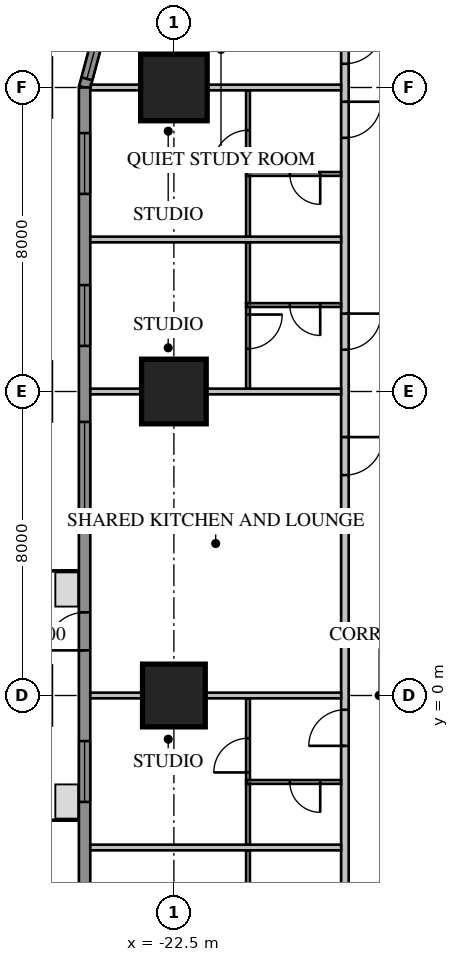
"""IFC4 building model, lengths in metres.
Left out: names, types, materials, properties, quantities, classifications, styles, units other than length and angle.
Written with IfcOpenShell. Run it as: python <this file> out.ifc"""

import sys

from ifc_helpers import new_model, si_unit, direction, frame, frame_2d, origin, origin_2d, place, context, subcontext, project, spatial, rectangle, extrude, element, fill, save


model = new_model("IFC4")
c1 = context("Model", 3, precision=1e-05, world=origin(), true_north=direction((0.0, 1.0)))
c2 = subcontext(c1, "Body", "Model", "MODEL_VIEW")
j1 = project(units=[si_unit("LENGTHUNIT", "METRE"), si_unit("PLANEANGLEUNIT", "RADIAN")], contexts=[c1])
p1 = place(None, origin())
s1 = spatial("IfcSite", under=j1, at=p1, CompositionType="ELEMENT")
p2 = place(p1, origin())
s2 = spatial("IfcBuilding", under=s1, at=p2, CompositionType="ELEMENT")
p3 = place(p2, frame((0.0, 0.0, 46.8)))
s3 = spatial("IfcBuildingStorey", under=s2, at=p3, CompositionType="ELEMENT", Elevation=46.8)
p4 = place(p3, frame((-22.5, 16.0, 0.0), z_axis=(0.0, 0.0, 1.0), x_axis=(1.0, 0.0, 0.0)))
e1 = element("IfcColumn", 1, at=p4, inside=s3, PredefinedType="COLUMN", context=c2, shape_type="SweptSolid", body=[
    extrude(rectangle(XDim=1.75, YDim=1.75, at=origin_2d()), origin(), (0.0, 0.0, 1.0), 3.85),
])
p5 = place(p3, frame((-22.5, 8.0, 0.0), z_axis=(0.0, 0.0, 1.0), x_axis=(1.0, 0.0, 0.0)))
e2 = element("IfcColumn", 2, at=p5, inside=s3, PredefinedType="COLUMN", context=c2, shape_type="SweptSolid", body=[
    extrude(rectangle(XDim=1.7, YDim=1.7, at=origin_2d()), origin(), (0.0, 0.0, 1.0), 3.85),
])
p6 = place(p3, frame((-22.5, 0.0, 0.0), z_axis=(0.0, 0.0, 1.0), x_axis=(1.0, 0.0, 0.0)))
e3 = element("IfcColumn", 3, at=p6, inside=s3, PredefinedType="COLUMN", context=c2, shape_type="SweptSolid", body=[
    extrude(rectangle(XDim=1.65, YDim=1.65, at=origin_2d()), origin(), (0.0, 0.0, 1.0), 3.85),
])
p7 = place(p3, frame((-23.664, 20.425, 0.0), z_axis=(0.0, 0.0, 1.0), x_axis=(-0.258839972501, -0.965920218567, 0.0)))
e4 = element("IfcWall", 4, at=p7, inside=s3, PredefinedType="SOLIDWALL", context=c2, shape_type="SweptSolid", body=[
    extrude(rectangle(XDim=4.581, YDim=0.3, at=frame_2d((2.291, 0.0))), origin(), (0.0, 0.0, 1.0), 3.65),
])
p8 = place(p7, frame((2.746, 0.0, 0.75)))
e5 = element("IfcOpeningElement", 5, at=p8, cuts=e4, PredefinedType="OPENING", context=c2, shape_type="SweptSolid", body=[
    extrude(rectangle(XDim=1.6, YDim=1.8, at=frame_2d((0.8, 0.9))), frame((0.0, 0.17, 0.0), z_axis=(0.0, -1.0, 0.0), x_axis=(1.0, 0.0, 0.0)), (0.0, 0.0, 1.0), 0.34),
])
p9 = place(p3, frame((-24.85, 16.0, 0.0), z_axis=(0.0, 0.0, 1.0), x_axis=(0.0, -1.0, 0.0)))
e6 = element("IfcWall", 6, at=p9, inside=s3, PredefinedType="SOLIDWALL", context=c2, shape_type="SweptSolid", body=[
    extrude(rectangle(XDim=32.0, YDim=0.3, at=frame_2d((16.0, 0.0))), origin(), (0.0, 0.0, 1.0), 3.65),
])
p10 = place(p9, frame((1.2, 0.0, 0.75)))
e7 = element("IfcOpeningElement", 7, at=p10, cuts=e6, PredefinedType="OPENING", context=c2, shape_type="SweptSolid", body=[
    extrude(rectangle(XDim=1.6, YDim=1.8, at=frame_2d((0.8, 0.9))), frame((0.0, 0.17, 0.0), z_axis=(0.0, -1.0, 0.0), x_axis=(1.0, 0.0, 0.0)), (0.0, 0.0, 1.0), 0.34),
])
p11 = place(p9, frame((5.2, 0.0, 0.75)))
e8 = element("IfcOpeningElement", 8, at=p11, cuts=e6, PredefinedType="OPENING", context=c2, shape_type="SweptSolid", body=[
    extrude(rectangle(XDim=1.6, YDim=1.8, at=frame_2d((0.8, 0.9))), frame((0.0, 0.17, 0.0), z_axis=(0.0, -1.0, 0.0), x_axis=(1.0, 0.0, 0.0)), (0.0, 0.0, 1.0), 0.34),
])
p12 = place(p9, frame((17.2, 0.0, 0.75)))
e9 = element("IfcOpeningElement", 9, at=p12, cuts=e6, PredefinedType="OPENING", context=c2, shape_type="SweptSolid", body=[
    extrude(rectangle(XDim=1.6, YDim=1.8, at=frame_2d((0.8, 0.9))), frame((0.0, 0.17, 0.0), z_axis=(0.0, -1.0, 0.0), x_axis=(1.0, 0.0, 0.0)), (0.0, 0.0, 1.0), 0.34),
])
p13 = place(p9, frame((21.2, 0.0, 0.75)))
e10 = element("IfcOpeningElement", 10, at=p13, cuts=e6, PredefinedType="OPENING", context=c2, shape_type="SweptSolid", body=[
    extrude(rectangle(XDim=1.6, YDim=1.8, at=frame_2d((0.8, 0.9))), frame((0.0, 0.17, 0.0), z_axis=(0.0, -1.0, 0.0), x_axis=(1.0, 0.0, 0.0)), (0.0, 0.0, 1.0), 0.34),
])
p14 = place(p9, frame((25.2, 0.0, 0.75)))
e11 = element("IfcOpeningElement", 11, at=p14, cuts=e6, PredefinedType="OPENING", context=c2, shape_type="SweptSolid", body=[
    extrude(rectangle(XDim=1.6, YDim=1.8, at=frame_2d((0.8, 0.9))), frame((0.0, 0.17, 0.0), z_axis=(0.0, -1.0, 0.0), x_axis=(1.0, 0.0, 0.0)), (0.0, 0.0, 1.0), 0.34),
])
p15 = place(p9, frame((29.2, 0.0, 0.75)))
e12 = element("IfcOpeningElement", 12, at=p15, cuts=e6, PredefinedType="OPENING", context=c2, shape_type="SweptSolid", body=[
    extrude(rectangle(XDim=1.6, YDim=1.8, at=frame_2d((0.8, 0.9))), frame((0.0, 0.17, 0.0), z_axis=(0.0, -1.0, 0.0), x_axis=(1.0, 0.0, 0.0)), (0.0, 0.0, 1.0), 0.34),
])
p16 = place(p9, frame((8.8, 0.0, 0.75)))
e13 = element("IfcOpeningElement", 13, at=p16, cuts=e6, PredefinedType="OPENING", context=c2, shape_type="SweptSolid", body=[
    extrude(rectangle(XDim=2.4, YDim=1.8, at=frame_2d((1.2, 0.9))), frame((0.0, 0.17, 0.0), z_axis=(0.0, -1.0, 0.0), x_axis=(1.0, 0.0, 0.0)), (0.0, 0.0, 1.0), 0.34),
])
p17 = place(p9, frame((13.812, 0.0, 0.0)))
e14 = element("IfcOpeningElement", 14, at=p17, cuts=e6, PredefinedType="OPENING", context=c2, shape_type="SweptSolid", body=[
    extrude(rectangle(XDim=1.0, YDim=2.4, at=frame_2d((0.5, 1.2))), frame((0.0, 0.17, 0.0), z_axis=(0.0, -1.0, 0.0), x_axis=(1.0, 0.0, 0.0)), (0.0, 0.0, 1.0), 0.34),
])
p18 = place(p3, frame((-18.0, 18.0, 0.0), z_axis=(0.0, 0.0, 1.0), x_axis=(0.0, -1.0, 0.0)))
e15 = element("IfcWall", 15, at=p18, inside=s3, PredefinedType="PARTITIONING", context=c2, shape_type="SweptSolid", body=[
    extrude(rectangle(XDim=36.0, YDim=0.2, at=frame_2d((18.0, 0.0))), origin(), (0.0, 0.0, 1.0), 3.65),
])
p19 = place(p18, frame((0.375, 0.0, 0.0)))
e16 = element("IfcOpeningElement", 16, at=p19, cuts=e15, PredefinedType="OPENING", context=c2, shape_type="SweptSolid", body=[
    extrude(rectangle(XDim=1.0, YDim=2.1, at=frame_2d((0.5, 1.05))), frame((0.0, 0.12, 0.0), z_axis=(0.0, -1.0, 0.0), x_axis=(1.0, 0.0, 0.0)), (0.0, 0.0, 1.0), 0.24),
])
p20 = place(p18, frame((2.375, 0.0, 0.0)))
e17 = element("IfcOpeningElement", 17, at=p20, cuts=e15, PredefinedType="OPENING", context=c2, shape_type="SweptSolid", body=[
    extrude(rectangle(XDim=0.95, YDim=2.1, at=frame_2d((0.475, 1.05))), frame((0.0, 0.12, 0.0), z_axis=(0.0, -1.0, 0.0), x_axis=(1.0, 0.0, 0.0)), (0.0, 0.0, 1.0), 0.24),
])
p21 = place(p18, frame((7.95, 0.0, 0.0)))
e18 = element("IfcOpeningElement", 18, at=p21, cuts=e15, PredefinedType="OPENING", context=c2, shape_type="SweptSolid", body=[
    extrude(rectangle(XDim=0.95, YDim=2.1, at=frame_2d((0.475, 1.05))), frame((0.0, 0.12, 0.0), z_axis=(0.0, -1.0, 0.0), x_axis=(1.0, 0.0, 0.0)), (0.0, 0.0, 1.0), 0.24),
])
p22 = place(p18, frame((18.375, 0.0, 0.0)))
e19 = element("IfcOpeningElement", 19, at=p22, cuts=e15, PredefinedType="OPENING", context=c2, shape_type="SweptSolid", body=[
    extrude(rectangle(XDim=0.95, YDim=2.1, at=frame_2d((0.475, 1.05))), frame((0.0, 0.12, 0.0), z_axis=(0.0, -1.0, 0.0), x_axis=(1.0, 0.0, 0.0)), (0.0, 0.0, 1.0), 0.24),
])
p23 = place(p18, frame((23.95, 0.0, 0.0)))
e20 = element("IfcOpeningElement", 20, at=p23, cuts=e15, PredefinedType="OPENING", context=c2, shape_type="SweptSolid", body=[
    extrude(rectangle(XDim=0.95, YDim=2.1, at=frame_2d((0.475, 1.05))), frame((0.0, 0.12, 0.0), z_axis=(0.0, -1.0, 0.0), x_axis=(1.0, 0.0, 0.0)), (0.0, 0.0, 1.0), 0.24),
])
p24 = place(p18, frame((26.375, 0.0, 0.0)))
e21 = element("IfcOpeningElement", 21, at=p24, cuts=e15, PredefinedType="OPENING", context=c2, shape_type="SweptSolid", body=[
    extrude(rectangle(XDim=0.95, YDim=2.1, at=frame_2d((0.475, 1.05))), frame((0.0, 0.12, 0.0), z_axis=(0.0, -1.0, 0.0), x_axis=(1.0, 0.0, 0.0)), (0.0, 0.0, 1.0), 0.24),
])
p25 = place(p18, frame((31.95, 0.0, 0.0)))
e22 = element("IfcOpeningElement", 22, at=p25, cuts=e15, PredefinedType="OPENING", context=c2, shape_type="SweptSolid", body=[
    extrude(rectangle(XDim=0.95, YDim=2.1, at=frame_2d((0.475, 1.05))), frame((0.0, 0.12, 0.0), z_axis=(0.0, -1.0, 0.0), x_axis=(1.0, 0.0, 0.0)), (0.0, 0.0, 1.0), 0.24),
])
p26 = place(p18, frame((34.375, 0.0, 0.0)))
e23 = element("IfcOpeningElement", 23, at=p26, cuts=e15, PredefinedType="OPENING", context=c2, shape_type="SweptSolid", body=[
    extrude(rectangle(XDim=0.95, YDim=2.1, at=frame_2d((0.475, 1.05))), frame((0.0, 0.12, 0.0), z_axis=(0.0, -1.0, 0.0), x_axis=(1.0, 0.0, 0.0)), (0.0, 0.0, 1.0), 0.24),
])
p27 = place(p18, frame((11.2, 0.0, 0.0)))
e24 = element("IfcOpeningElement", 24, at=p27, cuts=e15, PredefinedType="OPENING", context=c2, shape_type="SweptSolid", body=[
    extrude(rectangle(XDim=1.0, YDim=2.1, at=frame_2d((0.5, 1.05))), frame((0.0, 0.12, 0.0), z_axis=(0.0, -1.0, 0.0), x_axis=(1.0, 0.0, 0.0)), (0.0, 0.0, 1.0), 0.24),
])
p28 = place(p3, frame((-18.1, 16.0, 0.0), z_axis=(0.0, 0.0, 1.0), x_axis=(-1.0, 0.0, 0.0)))
e25 = element("IfcWall", 25, at=p28, inside=s3, PredefinedType="PARTITIONING", context=c2, shape_type="SweptSolid", body=[
    extrude(rectangle(XDim=6.589, YDim=0.15, at=frame_2d((3.295, 0.0))), origin(), (0.0, 0.0, 1.0), 3.65),
])
for number, where, z_axis, x_axis in (
    (26, (-18.1, 12.0, 0.0), (0.0, 0.0, 1.0), (-1.0, 0.0, 0.0)),
    (27, (-18.1, 8.0, 0.0), (0.0, 0.0, 1.0), (-1.0, 0.0, 0.0)),
):
    element("IfcWall", number, at=place(p3, frame(where, z_axis=z_axis, x_axis=x_axis)), inside=s3, PredefinedType="PARTITIONING", context=c2, shape_type="SweptSolid", body=[
        extrude(rectangle(XDim=6.6, YDim=0.15, at=frame_2d((3.3, 0.0))), origin(), (0.0, 0.0, 1.0), 3.65),
    ])
p29 = place(p3, frame((-18.1, 0.0, 0.0), z_axis=(0.0, 0.0, 1.0), x_axis=(-1.0, 0.0, 0.0)))
e28 = element("IfcWall", 28, at=p29, inside=s3, PredefinedType="PARTITIONING", context=c2, shape_type="SweptSolid", body=[
    extrude(rectangle(XDim=6.6, YDim=0.15, at=frame_2d((3.3, 0.0))), origin(), (0.0, 0.0, 1.0), 2.957),
])
p30 = place(p3, frame((-18.1, -4.0, 0.0), z_axis=(0.0, 0.0, 1.0), x_axis=(-1.0, 0.0, 0.0)))
e29 = element("IfcWall", 29, at=p30, inside=s3, PredefinedType="PARTITIONING", context=c2, shape_type="SweptSolid", body=[
    extrude(rectangle(XDim=6.6, YDim=0.15, at=frame_2d((3.3, 0.0))), origin(), (0.0, 0.0, 1.0), 3.65),
])
p31 = place(p3, frame((-18.1, 13.725, 0.0), z_axis=(0.0, 0.0, 1.0), x_axis=(-1.0, 0.0, 0.0)))
e30 = element("IfcWall", 30, at=p31, inside=s3, PredefinedType="PARTITIONING", context=c2, shape_type="SweptSolid", body=[
    extrude(rectangle(XDim=2.5, YDim=0.1, at=frame_2d((1.25, 0.0))), origin(), (0.0, 0.0, 1.0), 3.65),
])
p32 = place(p31, frame((0.55, 0.0, 0.0)))
e31 = element("IfcOpeningElement", 31, at=p32, cuts=e30, PredefinedType="OPENING", context=c2, shape_type="SweptSolid", body=[
    extrude(rectangle(XDim=0.8, YDim=2.1, at=frame_2d((0.4, 1.05))), frame((0.0, 0.07, 0.0), z_axis=(0.0, -1.0, 0.0), x_axis=(1.0, 0.0, 0.0)), (0.0, 0.0, 1.0), 0.14),
])
p33 = place(p3, frame((-20.55, 13.675, 0.0), z_axis=(0.0, 0.0, 1.0), x_axis=(0.0, -1.0, 0.0)))
e32 = element("IfcWall", 32, at=p33, inside=s3, PredefinedType="PARTITIONING", context=c2, shape_type="SweptSolid", body=[
    extrude(rectangle(XDim=1.6, YDim=0.1, at=frame_2d((0.8, 0.0))), origin(), (0.0, 0.0, 1.0), 3.65),
])
p34 = place(p3, frame((-18.1, 10.275, 0.0), z_axis=(0.0, 0.0, 1.0), x_axis=(-1.0, 0.0, 0.0)))
e33 = element("IfcWall", 33, at=p34, inside=s3, PredefinedType="PARTITIONING", context=c2, shape_type="SweptSolid", body=[
    extrude(rectangle(XDim=2.5, YDim=0.1, at=frame_2d((1.25, 0.0))), origin(), (0.0, 0.0, 1.0), 3.65),
])
p35 = place(p34, frame((0.55, 0.0, 0.0)))
e34 = element("IfcOpeningElement", 34, at=p35, cuts=e33, PredefinedType="OPENING", context=c2, shape_type="SweptSolid", body=[
    extrude(rectangle(XDim=0.8, YDim=2.1, at=frame_2d((0.4, 1.05))), frame((0.0, 0.07, 0.0), z_axis=(0.0, -1.0, 0.0), x_axis=(1.0, 0.0, 0.0)), (0.0, 0.0, 1.0), 0.14),
])
p36 = place(p3, frame((-20.55, 11.925, 0.0), z_axis=(0.0, 0.0, 1.0), x_axis=(0.0, -1.0, 0.0)))
e35 = element("IfcWall", 35, at=p36, inside=s3, PredefinedType="PARTITIONING", context=c2, shape_type="SweptSolid", body=[
    extrude(rectangle(XDim=1.6, YDim=0.1, at=frame_2d((0.8, 0.0))), origin(), (0.0, 0.0, 1.0), 3.65),
])
p37 = place(p3, frame((-18.1, -2.275, 0.0), z_axis=(0.0, 0.0, 1.0), x_axis=(-1.0, 0.0, 0.0)))
e36 = element("IfcWall", 36, at=p37, inside=s3, PredefinedType="PARTITIONING", context=c2, shape_type="SweptSolid", body=[
    extrude(rectangle(XDim=2.5, YDim=0.1, at=frame_2d((1.25, 0.0))), origin(), (0.0, 0.0, 1.0), 3.65),
])
p38 = place(p37, frame((0.55, 0.0, 0.0)))
e37 = element("IfcOpeningElement", 37, at=p38, cuts=e36, PredefinedType="OPENING", context=c2, shape_type="SweptSolid", body=[
    extrude(rectangle(XDim=0.8, YDim=2.1, at=frame_2d((0.4, 1.05))), frame((0.0, 0.07, 0.0), z_axis=(0.0, -1.0, 0.0), x_axis=(1.0, 0.0, 0.0)), (0.0, 0.0, 1.0), 0.14),
])
for number, where, z_axis, x_axis in (
    (38, (-20.55, -2.325, 0.0), (0.0, 0.0, 1.0), (0.0, -1.0, 0.0)),
    (39, (-20.55, -4.075, 0.0), (0.0, 0.0, 1.0), (0.0, -1.0, 0.0)),
):
    element("IfcWall", number, at=place(p3, frame(where, z_axis=z_axis, x_axis=x_axis)), inside=s3, PredefinedType="PARTITIONING", context=c2, shape_type="SweptSolid", body=[
        extrude(rectangle(XDim=1.6, YDim=0.1, at=frame_2d((0.8, 0.0))), origin(), (0.0, 0.0, 1.0), 3.65),
    ])
p39 = place(p3, frame((-20.55, 15.925, 0.0), z_axis=(0.0, 0.0, 1.0), x_axis=(0.0, -1.0, 0.0)))
e40 = element("IfcWall", 40, at=p39, inside=s3, PredefinedType="PARTITIONING", context=c2, shape_type="SweptSolid", body=[
    extrude(rectangle(XDim=2.15, YDim=0.1, at=frame_2d((1.075, 0.0))), origin(), (0.0, 0.0, 1.0), 3.65),
])
p40 = place(p39, frame((1.05, 0.0, 0.0)))
e41 = element("IfcOpeningElement", 41, at=p40, cuts=e40, PredefinedType="OPENING", context=c2, shape_type="SweptSolid", body=[
    extrude(rectangle(XDim=0.9, YDim=2.1, at=frame_2d((0.45, 1.05))), frame((0.0, 0.07, 0.0), z_axis=(0.0, -1.0, 0.0), x_axis=(1.0, 0.0, 0.0)), (0.0, 0.0, 1.0), 0.14),
])
p41 = place(p3, frame((-20.55, 10.225, 0.0), z_axis=(0.0, 0.0, 1.0), x_axis=(0.0, -1.0, 0.0)))
e42 = element("IfcWall", 42, at=p41, inside=s3, PredefinedType="PARTITIONING", context=c2, shape_type="SweptSolid", body=[
    extrude(rectangle(XDim=2.15, YDim=0.1, at=frame_2d((1.075, 0.0))), origin(), (0.0, 0.0, 1.0), 3.65),
])
p42 = place(p41, frame((0.2, 0.0, 0.0)))
e43 = element("IfcOpeningElement", 43, at=p42, cuts=e42, PredefinedType="OPENING", context=c2, shape_type="SweptSolid", body=[
    extrude(rectangle(XDim=0.9, YDim=2.1, at=frame_2d((0.45, 1.05))), frame((0.0, 0.07, 0.0), z_axis=(0.0, -1.0, 0.0), x_axis=(1.0, 0.0, 0.0)), (0.0, 0.0, 1.0), 0.14),
])
p43 = place(p3, frame((-20.55, -0.075, 0.0), z_axis=(0.0, 0.0, 1.0), x_axis=(0.0, -1.0, 0.0)))
e44 = element("IfcWall", 44, at=p43, inside=s3, PredefinedType="PARTITIONING", context=c2, shape_type="SweptSolid", body=[
    extrude(rectangle(XDim=2.15, YDim=0.1, at=frame_2d((1.075, 0.0))), origin(), (0.0, 0.0, 1.0), 3.65),
])
p44 = place(p43, frame((1.05, 0.0, 0.0)))
e45 = element("IfcOpeningElement", 45, at=p44, cuts=e44, PredefinedType="OPENING", context=c2, shape_type="SweptSolid", body=[
    extrude(rectangle(XDim=0.9, YDim=2.1, at=frame_2d((0.45, 1.05))), frame((0.0, 0.07, 0.0), z_axis=(0.0, -1.0, 0.0), x_axis=(1.0, 0.0, 0.0)), (0.0, 0.0, 1.0), 0.14),
])
p45 = place(p8, origin())
e46 = element("IfcWindow", 46, at=p45, inside=s3, PartitioningType="SINGLE_PANEL", PredefinedType="WINDOW", context=c2, shape_type="SweptSolid", body=[
    extrude(rectangle(XDim=1.6, YDim=1.8, at=frame_2d((0.8, 0.9))), frame((0.0, 0.03, 0.0), z_axis=(0.0, -1.0, 0.0), x_axis=(1.0, 0.0, 0.0)), (0.0, 0.0, 1.0), 0.06),
])
fill(e5, e46)
p46 = place(p10, origin())
e47 = element("IfcWindow", 47, at=p46, inside=s3, PartitioningType="SINGLE_PANEL", PredefinedType="WINDOW", context=c2, shape_type="SweptSolid", body=[
    extrude(rectangle(XDim=1.6, YDim=1.8, at=frame_2d((0.8, 0.9))), frame((0.0, 0.03, 0.0), z_axis=(0.0, -1.0, 0.0), x_axis=(1.0, 0.0, 0.0)), (0.0, 0.0, 1.0), 0.06),
])
fill(e7, e47)
p47 = place(p11, origin())
e48 = element("IfcWindow", 48, at=p47, inside=s3, PartitioningType="SINGLE_PANEL", PredefinedType="WINDOW", context=c2, shape_type="SweptSolid", body=[
    extrude(rectangle(XDim=1.6, YDim=1.8, at=frame_2d((0.8, 0.9))), frame((0.0, 0.03, 0.0), z_axis=(0.0, -1.0, 0.0), x_axis=(1.0, 0.0, 0.0)), (0.0, 0.0, 1.0), 0.06),
])
fill(e8, e48)
p48 = place(p12, origin())
e49 = element("IfcWindow", 49, at=p48, inside=s3, PartitioningType="SINGLE_PANEL", PredefinedType="WINDOW", context=c2, shape_type="SweptSolid", body=[
    extrude(rectangle(XDim=1.6, YDim=1.8, at=frame_2d((0.8, 0.9))), frame((0.0, 0.03, 0.0), z_axis=(0.0, -1.0, 0.0), x_axis=(1.0, 0.0, 0.0)), (0.0, 0.0, 1.0), 0.06),
])
fill(e9, e49)
p49 = place(p16, origin())
e50 = element("IfcWindow", 50, at=p49, inside=s3, PartitioningType="SINGLE_PANEL", PredefinedType="WINDOW", context=c2, shape_type="SweptSolid", body=[
    extrude(rectangle(XDim=2.4, YDim=1.8, at=frame_2d((1.2, 0.9))), frame((0.0, 0.03, 0.0), z_axis=(0.0, -1.0, 0.0), x_axis=(1.0, 0.0, 0.0)), (0.0, 0.0, 1.0), 0.06),
])
fill(e13, e50)
p50 = place(p17, origin())
e51 = element("IfcDoor", 51, at=p50, inside=s3, OperationType="SINGLE_SWING_RIGHT", PredefinedType="DOOR", context=c2, shape_type="SweptSolid", body=[
    extrude(rectangle(XDim=1.0, YDim=2.4, at=frame_2d((0.5, 1.2))), frame((0.0, 0.025, 0.0), z_axis=(0.0, -1.0, 0.0), x_axis=(1.0, 0.0, 0.0)), (0.0, 0.0, 1.0), 0.05),
])
fill(e14, e51)
p51 = place(p19, origin())
e52 = element("IfcDoor", 52, at=p51, inside=s3, OperationType="SINGLE_SWING_LEFT", PredefinedType="DOOR", context=c2, shape_type="SweptSolid", body=[
    extrude(rectangle(XDim=1.0, YDim=2.1, at=frame_2d((0.5, 1.05))), frame((0.0, 0.025, 0.0), z_axis=(0.0, -1.0, 0.0), x_axis=(1.0, 0.0, 0.0)), (0.0, 0.0, 1.0), 0.05),
])
fill(e16, e52)
p52 = place(p20, origin())
e53 = element("IfcDoor", 53, at=p52, inside=s3, OperationType="SINGLE_SWING_LEFT", PredefinedType="DOOR", context=c2, shape_type="SweptSolid", body=[
    extrude(rectangle(XDim=0.95, YDim=2.1, at=frame_2d((0.475, 1.05))), frame((0.0, 0.025, 0.0), z_axis=(0.0, -1.0, 0.0), x_axis=(1.0, 0.0, 0.0)), (0.0, 0.0, 1.0), 0.05),
])
fill(e17, e53)
p53 = place(p32, origin())
e54 = element("IfcDoor", 54, at=p53, inside=s3, OperationType="SINGLE_SWING_LEFT", PredefinedType="DOOR", context=c2, shape_type="SweptSolid", body=[
    extrude(rectangle(XDim=0.8, YDim=2.1, at=frame_2d((0.4, 1.05))), frame((0.0, 0.025, 0.0), z_axis=(0.0, -1.0, 0.0), x_axis=(1.0, 0.0, 0.0)), (0.0, 0.0, 1.0), 0.05),
])
fill(e31, e54)
p54 = place(p21, origin())
e55 = element("IfcDoor", 55, at=p54, inside=s3, OperationType="SINGLE_SWING_LEFT", PredefinedType="DOOR", context=c2, shape_type="SweptSolid", body=[
    extrude(rectangle(XDim=0.95, YDim=2.1, at=frame_2d((0.475, 1.05))), frame((0.0, 0.025, 0.0), z_axis=(0.0, -1.0, 0.0), x_axis=(1.0, 0.0, 0.0)), (0.0, 0.0, 1.0), 0.05),
])
fill(e18, e55)
p55 = place(p35, origin())
e56 = element("IfcDoor", 56, at=p55, inside=s3, OperationType="SINGLE_SWING_LEFT", PredefinedType="DOOR", context=c2, shape_type="SweptSolid", body=[
    extrude(rectangle(XDim=0.8, YDim=2.1, at=frame_2d((0.4, 1.05))), frame((0.0, 0.025, 0.0), z_axis=(0.0, -1.0, 0.0), x_axis=(1.0, 0.0, 0.0)), (0.0, 0.0, 1.0), 0.05),
])
fill(e34, e56)
p56 = place(p22, origin())
e57 = element("IfcDoor", 57, at=p56, inside=s3, OperationType="SINGLE_SWING_RIGHT", PredefinedType="DOOR", context=c2, shape_type="SweptSolid", body=[
    extrude(rectangle(XDim=0.95, YDim=2.1, at=frame_2d((0.475, 1.05))), frame((0.0, 0.025, 0.0), z_axis=(0.0, -1.0, 0.0), x_axis=(1.0, 0.0, 0.0)), (0.0, 0.0, 1.0), 0.05),
])
fill(e19, e57)
p57 = place(p38, origin())
e58 = element("IfcDoor", 58, at=p57, inside=s3, OperationType="SINGLE_SWING_LEFT", PredefinedType="DOOR", context=c2, shape_type="SweptSolid", body=[
    extrude(rectangle(XDim=0.8, YDim=2.1, at=frame_2d((0.4, 1.05))), frame((0.0, 0.025, 0.0), z_axis=(0.0, -1.0, 0.0), x_axis=(1.0, 0.0, 0.0)), (0.0, 0.0, 1.0), 0.05),
])
fill(e37, e58)
p58 = place(p27, origin())
e59 = element("IfcDoor", 59, at=p58, inside=s3, OperationType="SINGLE_SWING_LEFT", PredefinedType="DOOR", context=c2, shape_type="SweptSolid", body=[
    extrude(rectangle(XDim=1.0, YDim=2.1, at=frame_2d((0.5, 1.05))), frame((0.0, 0.025, 0.0), z_axis=(0.0, -1.0, 0.0), x_axis=(1.0, 0.0, 0.0)), (0.0, 0.0, 1.0), 0.05),
])
fill(e24, e59)
p59 = place(p40, origin())
e60 = element("IfcDoor", 60, at=p59, inside=s3, OperationType="SINGLE_SWING_RIGHT", PredefinedType="DOOR", context=c2, shape_type="SweptSolid", body=[
    extrude(rectangle(XDim=0.9, YDim=2.1, at=frame_2d((0.45, 1.05))), frame((0.0, 0.025, 0.0), z_axis=(0.0, -1.0, 0.0), x_axis=(1.0, 0.0, 0.0)), (0.0, 0.0, 1.0), 0.05),
])
fill(e41, e60)
p60 = place(p42, origin())
e61 = element("IfcDoor", 61, at=p60, inside=s3, OperationType="SINGLE_SWING_LEFT", PredefinedType="DOOR", context=c2, shape_type="SweptSolid", body=[
    extrude(rectangle(XDim=0.9, YDim=2.1, at=frame_2d((0.45, 1.05))), frame((0.0, 0.025, 0.0), z_axis=(0.0, -1.0, 0.0), x_axis=(1.0, 0.0, 0.0)), (0.0, 0.0, 1.0), 0.05),
])
fill(e43, e61)
p61 = place(p44, origin())
e62 = element("IfcDoor", 62, at=p61, inside=s3, OperationType="SINGLE_SWING_RIGHT", PredefinedType="DOOR", context=c2, shape_type="SweptSolid", body=[
    extrude(rectangle(XDim=0.9, YDim=2.1, at=frame_2d((0.45, 1.05))), frame((0.0, 0.025, 0.0), z_axis=(0.0, -1.0, 0.0), x_axis=(1.0, 0.0, 0.0)), (0.0, 0.0, 1.0), 0.05),
])
fill(e45, e62)
save(model, sys.argv[1])
